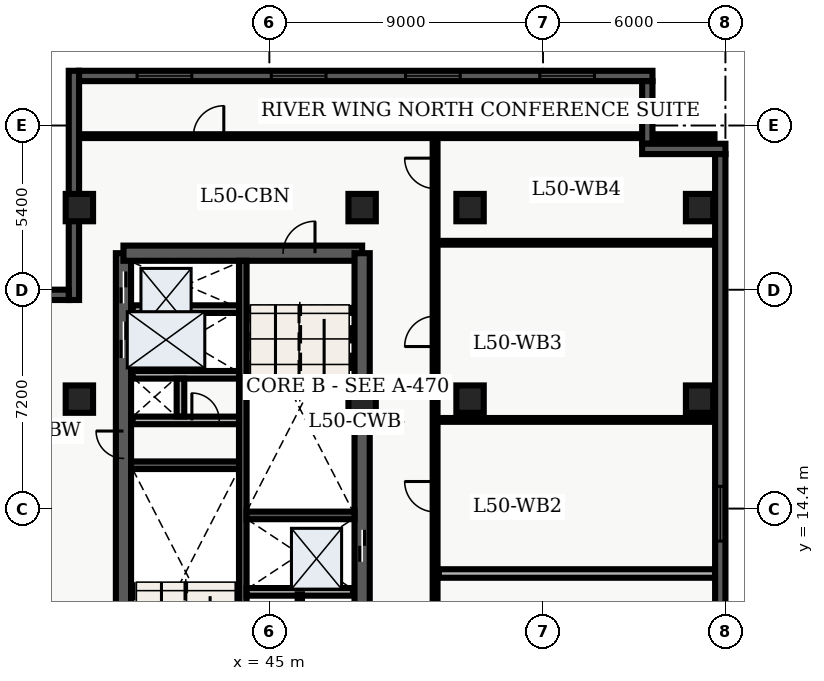
"""IFC4 building model, lengths in metres.
Left out: names, types, materials, properties, quantities, classifications, styles, units other than length and angle.
Written with IfcOpenShell. Run it as: python <this file> out.ifc"""

import sys

from ifc_helpers import new_model, entity, si_unit, converted_unit, direction, frame, origin_with_axes, origin_2d_with_axis, place, context, subcontext, project, spatial, polyline, rectangle, outline, extrude, element, fill, save


model = new_model("IFC4")
c1 = context("Model", 3, precision=1e-05, world=origin_with_axes(), true_north=direction((0.0, 1.0)))
c2 = subcontext(c1, "Body", "Model", "MODEL_VIEW")
j1 = project(units=[si_unit("LENGTHUNIT", "METRE"), converted_unit("PLANEANGLEUNIT", "DEGREE", entity("IfcPlaneAngleMeasure", 0.017), si_unit("PLANEANGLEUNIT", "RADIAN"), dimensions=[0, 0, 0, 0, 0, 0, 0])], contexts=[c1])
p1 = place(None, origin_with_axes())
s1 = spatial("IfcSite", under=j1, at=p1, CompositionType="ELEMENT")
p2 = place(p1, origin_with_axes())
s2 = spatial("IfcBuilding", under=s1, at=p2, CompositionType="ELEMENT")
p3 = place(p2, frame((0.0, 0.0, 204.3), z_axis=(0.0, 0.0, 1.0), x_axis=(1.0, 0.0, 0.0)))
s3 = spatial("IfcBuildingStorey", under=s2, at=p3, CompositionType="ELEMENT", Elevation=204.3)
p4 = place(p3, frame((40.2, 7.2, 0.0), z_axis=(0.0, 0.0, 1.0), x_axis=(0.0, 1.0, 0.0)))
e1 = element("IfcWall", 1, at=p4, inside=s3, PredefinedType="SHEAR", context=c2, shape_type="SweptSolid", body=[
    extrude(outline(polyline([(0.0, -0.25), (15.6, -0.25), (15.6, 0.25), (0.0, 0.25), (0.0, -0.25)])), origin_with_axes(), (0.0, 0.0, 1.0), 3.66),
])
p5 = place(p4, frame((14.475, 0.0, 0.0), z_axis=(0.0, 0.0, 1.0), x_axis=(1.0, 0.0, 0.0)))
e2 = element("IfcOpeningElement", 2, at=p5, cuts=e1, PredefinedType="OPENING", context=c2, shape_type="SweptSolid", body=[
    extrude(rectangle(XDim=1.05, YDim=0.52, at=origin_2d_with_axis()), origin_with_axes(), (0.0, 0.0, 1.0), 2.15),
])
p6 = place(p4, frame((12.75, 0.0, 0.0), z_axis=(0.0, 0.0, 1.0), x_axis=(1.0, 0.0, 0.0)))
e3 = element("IfcOpeningElement", 3, at=p6, cuts=e1, PredefinedType="OPENING", context=c2, shape_type="SweptSolid", body=[
    extrude(rectangle(XDim=1.2, YDim=0.52, at=origin_2d_with_axis()), origin_with_axes(), (0.0, 0.0, 1.0), 2.15),
])
p7 = place(p4, frame((9.3, 0.0, 0.0), z_axis=(0.0, 0.0, 1.0), x_axis=(1.0, 0.0, 0.0)))
e4 = element("IfcOpeningElement", 4, at=p7, cuts=e1, PredefinedType="OPENING", context=c2, shape_type="SweptSolid", body=[
    extrude(rectangle(XDim=0.9, YDim=0.52, at=origin_2d_with_axis()), origin_with_axes(), (0.0, 0.0, 1.0), 2.15),
])
p8 = place(p3, frame((40.2, 22.8, 0.0), z_axis=(0.0, 0.0, 1.0), x_axis=(1.0, 0.0, 0.0)))
e5 = element("IfcWall", 5, at=p8, inside=s3, PredefinedType="SHEAR", context=c2, shape_type="SweptSolid", body=[
    extrude(outline(polyline([(0.0, -0.25), (7.85, -0.25), (7.85, 0.25), (0.0, 0.25), (0.0, -0.25)])), origin_with_axes(), (0.0, 0.0, 1.0), 3.66),
])
p9 = place(p8, frame((5.775, 0.0, 0.0), z_axis=(0.0, 0.0, 1.0), x_axis=(1.0, 0.0, 0.0)))
e6 = element("IfcOpeningElement", 6, at=p9, cuts=e5, PredefinedType="OPENING", context=c2, shape_type="SweptSolid", body=[
    extrude(rectangle(XDim=1.05, YDim=0.52, at=origin_2d_with_axis()), origin_with_axes(), (0.0, 0.0, 1.0), 2.15),
])
p10 = place(p3, frame((48.05, 7.2, 0.0), z_axis=(0.0, 0.0, 1.0), x_axis=(0.0, 1.0, 0.0)))
e7 = element("IfcWall", 7, at=p10, inside=s3, PredefinedType="SHEAR", context=c2, shape_type="SweptSolid", body=[
    extrude(outline(polyline([(0.0, -0.25), (15.6, -0.25), (15.6, 0.25), (0.0, 0.25), (0.0, -0.25)])), origin_with_axes(), (0.0, 0.0, 1.0), 3.66),
])
p11 = place(p10, frame((5.975, 0.0, 0.0), z_axis=(0.0, 0.0, 1.0), x_axis=(1.0, 0.0, 0.0)))
e8 = element("IfcOpeningElement", 8, at=p11, cuts=e7, PredefinedType="OPENING", context=c2, shape_type="SweptSolid", body=[
    extrude(rectangle(XDim=1.05, YDim=0.52, at=origin_2d_with_axis()), origin_with_axes(), (0.0, 0.0, 1.0), 2.15),
])
p12 = place(p10, frame((2.725, 0.0, 0.0), z_axis=(0.0, 0.0, 1.0), x_axis=(1.0, 0.0, 0.0)))
e9 = element("IfcOpeningElement", 9, at=p12, cuts=e7, PredefinedType="OPENING", context=c2, shape_type="SweptSolid", body=[
    extrude(rectangle(XDim=0.95, YDim=0.52, at=origin_2d_with_axis()), origin_with_axes(), (0.0, 0.0, 1.0), 2.15),
])
p13 = place(p3, frame((44.125, 7.45, 0.0), z_axis=(0.0, 0.0, 1.0), x_axis=(0.0, 1.0, 0.0)))
e10 = element("IfcWall", 10, at=p13, inside=s3, PredefinedType="SHEAR", context=c2, shape_type="SweptSolid", body=[
    extrude(outline(polyline([(0.0, -0.125), (15.1, -0.125), (15.1, 0.125), (0.0, 0.125), (0.0, -0.125)])), origin_with_axes(), (0.0, 0.0, 1.0), 3.66),
])
for number, where, z_axis, x_axis in (
    (11, (40.45, 15.825, 0.0), (0.0, 0.0, 1.0), (1.0, 0.0, 0.0)),
    (12, (44.25, 14.175, 0.0), (0.0, 0.0, 1.0), (1.0, 0.0, 0.0)),
):
    element("IfcWall", number, at=place(p3, frame(where, z_axis=z_axis, x_axis=x_axis)), inside=s3, PredefinedType="SHEAR", context=c2, shape_type="SweptSolid", body=[
        extrude(outline(polyline([(0.0, -0.125), (3.55, -0.125), (3.55, 0.125), (0.0, 0.125), (0.0, -0.125)])), origin_with_axes(), (0.0, 0.0, 1.0), 3.66),
    ])
p14 = place(p3, frame((40.5, 17.3, 0.0), z_axis=(0.0, 0.0, 1.0), x_axis=(1.0, 0.0, 0.0)))
e13 = element("IfcWall", 13, at=p14, inside=s3, PredefinedType="SOLIDWALL", context=c2, shape_type="SweptSolid", body=[
    extrude(outline(polyline([(0.0, -0.125), (3.5, -0.125), (3.5, 0.125), (0.0, 0.125), (0.0, -0.125)])), origin_with_axes(), (0.0, 0.0, 1.0), 2.7),
])
p15 = place(p14, frame((2.4, 0.0, 0.0), z_axis=(0.0, 0.0, 1.0), x_axis=(1.0, 0.0, 0.0)))
e14 = element("IfcOpeningElement", 14, at=p15, cuts=e13, PredefinedType="OPENING", context=c2, shape_type="SweptSolid", body=[
    extrude(rectangle(XDim=0.9, YDim=0.27, at=origin_2d_with_axis()), origin_with_axes(), (0.0, 0.0, 1.0), 2.15),
])
p16 = place(p3, frame((40.5, 18.8, 0.0), z_axis=(0.0, 0.0, 1.0), x_axis=(1.0, 0.0, 0.0)))
e15 = element("IfcWall", 15, at=p16, inside=s3, PredefinedType="SOLIDWALL", context=c2, shape_type="SweptSolid", body=[
    extrude(outline(polyline([(0.0, -0.125), (3.5, -0.125), (3.5, 0.125), (0.0, 0.125), (0.0, -0.125)])), origin_with_axes(), (0.0, 0.0, 1.0), 2.7),
])
p17 = place(p3, frame((42.075, 17.43, 0.0), z_axis=(0.0, 0.0, 1.0), x_axis=(0.0, 1.0, 0.0)))
e16 = element("IfcWall", 16, at=p17, inside=s3, PredefinedType="SOLIDWALL", context=c2, shape_type="SweptSolid", body=[
    extrude(outline(polyline([(0.0, -0.125), (1.24, -0.125), (1.24, 0.125), (0.0, 0.125), (0.0, -0.125)])), origin_with_axes(), (0.0, 0.0, 1.0), 2.7),
])
for number, where, z_axis, x_axis in (
    (17, (38.75, 18.0, 0.0), (0.0, 0.0, 1.0), (1.0, 0.0, 0.0)),
    (18, (38.75, 24.3, 0.0), (0.0, 0.0, 1.0), (1.0, 0.0, 0.0)),
    (19, (48.05, 18.0, 0.0), (0.0, 0.0, 1.0), (1.0, 0.0, 0.0)),
    (20, (48.05, 24.3, 0.0), (0.0, 0.0, 1.0), (1.0, 0.0, 0.0)),
    (21, (51.6, 18.0, 0.0), (0.0, 0.0, 1.0), (1.0, 0.0, 0.0)),
    (22, (51.6, 24.3, 0.0), (0.0, 0.0, 1.0), (1.0, 0.0, 0.0)),
    (23, (59.15, 18.0, 0.0), (0.0, 0.0, 1.0), (1.0, 0.0, 0.0)),
    (24, (59.15, 24.3, 0.0), (0.0, 0.0, 1.0), (1.0, 0.0, 0.0)),
):
    element("IfcColumn", number, at=place(p3, frame(where, z_axis=z_axis, x_axis=x_axis)), inside=s3, PredefinedType="COLUMN", context=c2, shape_type="SweptSolid", body=[
        extrude(rectangle(XDim=0.9, YDim=0.9, at=origin_2d_with_axis()), origin_with_axes(), (0.0, 0.0, 1.0), 3.9),
    ])
for number, where, z_axis, x_axis in (
    (25, (40.5, 20.96, 0.0), (0.0, 0.0, 1.0), (1.0, 0.0, 0.0)),
    (26, (44.25, 11.66, 0.0), (0.0, 0.0, 1.0), (1.0, 0.0, 0.0)),
):
    element("IfcWall", number, at=place(p3, frame(where, z_axis=z_axis, x_axis=x_axis)), inside=s3, PredefinedType="SOLIDWALL", context=c2, shape_type="SweptSolid", body=[
        extrude(outline(polyline([(0.0, -0.125), (3.5, -0.125), (3.5, 0.125), (0.0, 0.125), (0.0, -0.125)])), origin_with_axes(), (0.0, 0.0, 1.0), 2.7),
    ])
p18 = place(p3, frame((46.0, 7.5, 0.0), z_axis=(0.0, 0.0, 1.0), x_axis=(0.0, 1.0, 0.0)))
e27 = element("IfcWall", 27, at=p18, inside=s3, PredefinedType="PARTITIONING", context=c2, shape_type="SweptSolid", body=[
    extrude(outline(polyline([(0.0, -0.07), (4.08, -0.07), (4.08, 0.07), (0.0, 0.07), (0.0, -0.07)])), origin_with_axes(), (0.0, 0.0, 1.0), 2.7),
])
p19 = place(p18, frame((2.0, 0.0, 0.0), z_axis=(0.0, 0.0, 1.0), x_axis=(1.0, 0.0, 0.0)))
e28 = element("IfcOpeningElement", 28, at=p19, cuts=e27, PredefinedType="OPENING", context=c2, shape_type="SweptSolid", body=[
    extrude(rectangle(XDim=0.9, YDim=0.16, at=origin_2d_with_axis()), origin_with_axes(), (0.0, 0.0, 1.0), 2.15),
])
p20 = place(p3, frame((50.45, 7.85, 0.0), z_axis=(0.0, 0.0, 1.0), x_axis=(0.0, 1.0, 0.0)))
e29 = element("IfcWall", 29, at=p20, inside=s3, PredefinedType="PARTITIONING", context=c2, shape_type="SweptSolid", body=[
    extrude(outline(polyline([(0.0, -0.08), (18.8, -0.08), (18.8, 0.08), (0.0, 0.08), (0.0, -0.08)])), origin_with_axes(), (0.0, 0.0, 1.0), 2.7),
])
p21 = place(p20, frame((0.987, 0.0, 0.0), z_axis=(0.0, 0.0, 1.0), x_axis=(1.0, 0.0, 0.0)))
e30 = element("IfcOpeningElement", 30, at=p21, cuts=e29, PredefinedType="OPENING", context=c2, shape_type="SweptSolid", body=[
    extrude(rectangle(XDim=0.9, YDim=0.18, at=origin_2d_with_axis()), origin_with_axes(), (0.0, 0.0, 1.0), 2.15),
])
p22 = place(p20, frame((6.94, 0.0, 0.0), z_axis=(0.0, 0.0, 1.0), x_axis=(1.0, 0.0, 0.0)))
e31 = element("IfcOpeningElement", 31, at=p22, cuts=e29, PredefinedType="OPENING", context=c2, shape_type="SweptSolid", body=[
    extrude(rectangle(XDim=1.0, YDim=0.18, at=origin_2d_with_axis()), origin_with_axes(), (0.0, 0.0, 1.0), 2.15),
])
p23 = place(p20, frame((12.38, 0.0, 0.0), z_axis=(0.0, 0.0, 1.0), x_axis=(1.0, 0.0, 0.0)))
e32 = element("IfcOpeningElement", 32, at=p23, cuts=e29, PredefinedType="OPENING", context=c2, shape_type="SweptSolid", body=[
    extrude(rectangle(XDim=1.0, YDim=0.18, at=origin_2d_with_axis()), origin_with_axes(), (0.0, 0.0, 1.0), 2.15),
])
p24 = place(p20, frame((17.576, 0.0, 0.0), z_axis=(0.0, 0.0, 1.0), x_axis=(1.0, 0.0, 0.0)))
e33 = element("IfcOpeningElement", 33, at=p24, cuts=e29, PredefinedType="OPENING", context=c2, shape_type="SweptSolid", body=[
    extrude(rectangle(XDim=1.0, YDim=0.18, at=origin_2d_with_axis()), origin_with_axes(), (0.0, 0.0, 1.0), 2.15),
])
p25 = place(p3, frame((38.735, 26.65, 0.0), z_axis=(0.0, 0.0, 1.0), x_axis=(1.0, 0.0, 0.0)))
e34 = element("IfcWall", 34, at=p25, inside=s3, PredefinedType="PARTITIONING", context=c2, shape_type="SweptSolid", body=[
    extrude(outline(polyline([(0.0, -0.062), (20.905, -0.062), (20.905, 0.062), (0.0, 0.062), (0.0, -0.062)])), origin_with_axes(), (0.0, 0.0, 1.0), 2.7),
])
p26 = place(p25, frame((4.265, 0.0, 0.0), z_axis=(0.0, 0.0, 1.0), x_axis=(1.0, 0.0, 0.0)))
e35 = element("IfcOpeningElement", 35, at=p26, cuts=e34, PredefinedType="OPENING", context=c2, shape_type="SweptSolid", body=[
    extrude(rectangle(XDim=1.0, YDim=0.145, at=origin_2d_with_axis()), origin_with_axes(), (0.0, 0.0, 1.0), 2.15),
])
p27 = place(p3, frame((50.57, 12.264, 0.0), z_axis=(0.0, 0.0, 1.0), x_axis=(1.0, 0.0, 0.0)))
e36 = element("IfcWall", 36, at=p27, inside=s3, PredefinedType="PARTITIONING", context=c2, shape_type="SweptSolid", body=[
    extrude(outline(polyline([(0.0, -0.14), (9.095, -0.14), (9.095, 0.14), (0.0, 0.14), (0.0, -0.14)])), origin_with_axes(), (0.0, 0.0, 1.0), 2.7),
])
for number, where, z_axis, x_axis in (
    (37, (50.57, 17.316, 0.0), (0.0, 0.0, 1.0), (1.0, 0.0, 0.0)),
    (38, (50.57, 23.143, 0.0), (0.0, 0.0, 1.0), (1.0, 0.0, 0.0)),
):
    element("IfcWall", number, at=place(p3, frame(where, z_axis=z_axis, x_axis=x_axis)), inside=s3, PredefinedType="PARTITIONING", context=c2, shape_type="SweptSolid", body=[
        extrude(outline(polyline([(0.0, -0.062), (9.095, -0.062), (9.095, 0.062), (0.0, 0.062), (0.0, -0.062)])), origin_with_axes(), (0.0, 0.0, 1.0), 2.7),
    ])
p28 = place(p3, frame((38.57, 21.26, 0.0), z_axis=(0.0, 0.0, 1.0), x_axis=(0.0, 1.0, 0.0)))
e39 = element("IfcWall", 39, at=p28, inside=s3, PredefinedType="SOLIDWALL", context=c2, shape_type="SweptSolid", body=[
    extrude(outline(polyline([(0.0, -0.17), (7.54, -0.17), (7.54, 0.17), (0.0, 0.17), (0.0, -0.17)])), origin_with_axes(), (0.0, 0.0, 1.0), 3.66),
])
p29 = place(p3, frame((38.74, 28.63, 0.0), z_axis=(0.0, 0.0, 1.0), x_axis=(1.0, 0.0, 0.0)))
e40 = element("IfcWall", 40, at=p29, inside=s3, PredefinedType="SOLIDWALL", context=c2, shape_type="SweptSolid", body=[
    extrude(outline(polyline([(0.0, -0.17), (18.86, -0.17), (18.86, 0.17), (0.0, 0.17), (0.0, -0.17)])), origin_with_axes(), (0.0, 0.0, 1.0), 3.66),
])
p30 = place(p29, frame((2.808, 0.0, 0.45), z_axis=(0.0, 0.0, 1.0), x_axis=(1.0, 0.0, 0.0)))
e41 = element("IfcOpeningElement", 41, at=p30, cuts=e40, PredefinedType="OPENING", context=c2, shape_type="SweptSolid", body=[
    extrude(rectangle(XDim=1.8, YDim=0.36, at=origin_2d_with_axis()), origin_with_axes(), (0.0, 0.0, 1.0), 2.1),
])
p31 = place(p29, frame((7.222, 0.0, 0.45), z_axis=(0.0, 0.0, 1.0), x_axis=(1.0, 0.0, 0.0)))
e42 = element("IfcOpeningElement", 42, at=p31, cuts=e40, PredefinedType="OPENING", context=c2, shape_type="SweptSolid", body=[
    extrude(rectangle(XDim=1.8, YDim=0.36, at=origin_2d_with_axis()), origin_with_axes(), (0.0, 0.0, 1.0), 2.1),
])
p32 = place(p29, frame((11.637, 0.0, 0.45), z_axis=(0.0, 0.0, 1.0), x_axis=(1.0, 0.0, 0.0)))
e43 = element("IfcOpeningElement", 43, at=p32, cuts=e40, PredefinedType="OPENING", context=c2, shape_type="SweptSolid", body=[
    extrude(rectangle(XDim=1.8, YDim=0.36, at=origin_2d_with_axis()), origin_with_axes(), (0.0, 0.0, 1.0), 2.1),
])
p33 = place(p29, frame((16.053, 0.0, 0.45), z_axis=(0.0, 0.0, 1.0), x_axis=(1.0, 0.0, 0.0)))
e44 = element("IfcOpeningElement", 44, at=p33, cuts=e40, PredefinedType="OPENING", context=c2, shape_type="SweptSolid", body=[
    extrude(rectangle(XDim=1.8, YDim=0.36, at=origin_2d_with_axis()), origin_with_axes(), (0.0, 0.0, 1.0), 2.1),
])
p34 = place(p3, frame((57.43, 28.46, 0.0), z_axis=(0.0, 0.0, 1.0), x_axis=(0.0, -1.0, 0.0)))
e45 = element("IfcWall", 45, at=p34, inside=s3, PredefinedType="SOLIDWALL", context=c2, shape_type="SweptSolid", body=[
    extrude(outline(polyline([(0.0, -0.17), (2.06, -0.17), (2.06, 0.17), (0.0, 0.17), (0.0, -0.17)])), origin_with_axes(), (0.0, 0.0, 1.0), 3.66),
])
p35 = place(p3, frame((57.26, 26.23, 0.0), z_axis=(0.0, 0.0, 1.0), x_axis=(1.0, 0.0, 0.0)))
e46 = element("IfcWall", 46, at=p35, inside=s3, PredefinedType="SOLIDWALL", context=c2, shape_type="SweptSolid", body=[
    extrude(outline(polyline([(0.0, -0.17), (2.74, -0.17), (2.74, 0.17), (0.0, 0.17), (0.0, -0.17)])), origin_with_axes(), (0.0, 0.0, 1.0), 3.66),
])
p36 = place(p3, frame((59.83, 26.06, 0.0), z_axis=(0.0, 0.0, 1.0), x_axis=(0.0, -1.0, 0.0)))
e47 = element("IfcWall", 47, at=p36, inside=s3, PredefinedType="SOLIDWALL", context=c2, shape_type="SweptSolid", body=[
    extrude(outline(polyline([(0.0, -0.17), (23.66, -0.17), (23.66, 0.17), (0.0, 0.17), (0.0, -0.17)])), origin_with_axes(), (0.0, 0.0, 1.0), 3.66),
])
p37 = place(p36, frame((11.83, 0.0, 0.45), z_axis=(0.0, 0.0, 1.0), x_axis=(1.0, 0.0, 0.0)))
e48 = element("IfcOpeningElement", 48, at=p37, cuts=e47, PredefinedType="OPENING", context=c2, shape_type="SweptSolid", body=[
    extrude(rectangle(XDim=1.8, YDim=0.36, at=origin_2d_with_axis()), origin_with_axes(), (0.0, 0.0, 1.0), 2.1),
])
p38 = place(p36, frame((20.364, 0.0, 0.45), z_axis=(0.0, 0.0, 1.0), x_axis=(1.0, 0.0, 0.0)))
e49 = element("IfcOpeningElement", 49, at=p38, cuts=e47, PredefinedType="OPENING", context=c2, shape_type="SweptSolid", body=[
    extrude(rectangle(XDim=1.8, YDim=0.36, at=origin_2d_with_axis()), origin_with_axes(), (0.0, 0.0, 1.0), 2.1),
])
p39 = place(p3, frame((29.541, 21.43, 0.0), z_axis=(0.0, 0.0, 1.0), x_axis=(1.0, 0.0, 0.0)))
e50 = element("IfcWall", 50, at=p39, inside=s3, PredefinedType="SOLIDWALL", context=c2, shape_type="SweptSolid", body=[
    extrude(outline(polyline([(0.0, -0.17), (8.859, -0.17), (8.859, 0.17), (0.0, 0.17), (0.0, -0.17)])), origin_with_axes(), (0.0, 0.0, 1.0), 3.66),
])
p40 = place(p39, frame((4.429, 0.0, 0.45), z_axis=(0.0, 0.0, 1.0), x_axis=(1.0, 0.0, 0.0)))
e51 = element("IfcOpeningElement", 51, at=p40, cuts=e50, PredefinedType="OPENING", context=c2, shape_type="SweptSolid", body=[
    extrude(rectangle(XDim=1.8, YDim=0.36, at=origin_2d_with_axis()), origin_with_axes(), (0.0, 0.0, 1.0), 2.1),
])
p41 = place(p10, frame((5.975, 0.0, 0.0), z_axis=(0.0, 0.0, 1.0), x_axis=(1.0, 0.0, 0.0)))
e52 = element("IfcDoor", 52, at=p41, inside=s3, OperationType="SLIDING_TO_LEFT", PredefinedType="DOOR", context=c2, shape_type="SweptSolid", body=[
    extrude(rectangle(XDim=1.05, YDim=0.09, at=origin_2d_with_axis()), origin_with_axes(), (0.0, 0.0, 1.0), 2.15),
])
fill(e8, e52)
p42 = place(p4, frame((14.475, 0.0, 0.0), z_axis=(0.0, 0.0, 1.0), x_axis=(1.0, 0.0, 0.0)))
e53 = element("IfcDoor", 53, at=p42, inside=s3, OperationType="SLIDING_TO_RIGHT", PredefinedType="DOOR", context=c2, shape_type="SweptSolid", body=[
    extrude(rectangle(XDim=1.05, YDim=0.09, at=origin_2d_with_axis()), origin_with_axes(), (0.0, 0.0, 1.0), 2.15),
])
fill(e2, e53)
p43 = place(p4, frame((12.75, 0.0, 0.0), z_axis=(0.0, 0.0, 1.0), x_axis=(1.0, 0.0, 0.0)))
e54 = element("IfcDoor", 54, at=p43, inside=s3, OperationType="DOUBLE_DOOR_SLIDING", PredefinedType="DOOR", context=c2, shape_type="SweptSolid", body=[
    extrude(rectangle(XDim=1.2, YDim=0.09, at=origin_2d_with_axis()), origin_with_axes(), (0.0, 0.0, 1.0), 2.15),
])
fill(e3, e54)
p44 = place(p4, frame((9.3, 0.0, 0.0), z_axis=(0.0, 0.0, 1.0), x_axis=(1.0, 0.0, 0.0)))
e55 = element("IfcDoor", 55, at=p44, inside=s3, OperationType="SINGLE_SWING_RIGHT", PredefinedType="DOOR", context=c2, shape_type="SweptSolid", body=[
    extrude(rectangle(XDim=0.9, YDim=0.09, at=origin_2d_with_axis()), origin_with_axes(), (0.0, 0.0, 1.0), 2.15),
])
fill(e4, e55)
p45 = place(p14, frame((2.4, 0.0, 0.0), z_axis=(0.0, 0.0, 1.0), x_axis=(1.0, 0.0, 0.0)))
e56 = element("IfcDoor", 56, at=p45, inside=s3, OperationType="SINGLE_SWING_LEFT", PredefinedType="DOOR", context=c2, shape_type="SweptSolid", body=[
    extrude(rectangle(XDim=0.9, YDim=0.09, at=origin_2d_with_axis()), origin_with_axes(), (0.0, 0.0, 1.0), 2.15),
])
fill(e14, e56)
p46 = place(p8, frame((5.775, 0.0, 0.0), z_axis=(0.0, 0.0, 1.0), x_axis=(1.0, 0.0, 0.0)))
e57 = element("IfcDoor", 57, at=p46, inside=s3, OperationType="SINGLE_SWING_RIGHT", PredefinedType="DOOR", context=c2, shape_type="SweptSolid", body=[
    extrude(rectangle(XDim=1.05, YDim=0.09, at=origin_2d_with_axis()), origin_with_axes(), (0.0, 0.0, 1.0), 2.15),
])
fill(e6, e57)
p47 = place(p25, frame((4.265, 0.0, 0.0), z_axis=(0.0, 0.0, 1.0), x_axis=(1.0, 0.0, 0.0)))
e58 = element("IfcDoor", 58, at=p47, inside=s3, OperationType="SINGLE_SWING_RIGHT", PredefinedType="DOOR", context=c2, shape_type="SweptSolid", body=[
    extrude(rectangle(XDim=1.0, YDim=0.075, at=origin_2d_with_axis()), origin_with_axes(), (0.0, 0.0, 1.0), 2.15),
])
fill(e35, e58)
p48 = place(p20, frame((6.94, 0.0, 0.0), z_axis=(0.0, 0.0, 1.0), x_axis=(1.0, 0.0, 0.0)))
e59 = element("IfcDoor", 59, at=p48, inside=s3, OperationType="SINGLE_SWING_RIGHT", PredefinedType="DOOR", context=c2, shape_type="SweptSolid", body=[
    extrude(rectangle(XDim=1.0, YDim=0.09, at=origin_2d_with_axis()), origin_with_axes(), (0.0, 0.0, 1.0), 2.15),
])
fill(e31, e59)
p49 = place(p20, frame((12.38, 0.0, 0.0), z_axis=(0.0, 0.0, 1.0), x_axis=(1.0, 0.0, 0.0)))
e60 = element("IfcDoor", 60, at=p49, inside=s3, OperationType="SINGLE_SWING_LEFT", PredefinedType="DOOR", context=c2, shape_type="SweptSolid", body=[
    extrude(rectangle(XDim=1.0, YDim=0.09, at=origin_2d_with_axis()), origin_with_axes(), (0.0, 0.0, 1.0), 2.15),
])
fill(e32, e60)
p50 = place(p20, frame((17.576, 0.0, 0.0), z_axis=(0.0, 0.0, 1.0), x_axis=(1.0, 0.0, 0.0)))
e61 = element("IfcDoor", 61, at=p50, inside=s3, OperationType="SINGLE_SWING_RIGHT", PredefinedType="DOOR", context=c2, shape_type="SweptSolid", body=[
    extrude(rectangle(XDim=1.0, YDim=0.09, at=origin_2d_with_axis()), origin_with_axes(), (0.0, 0.0, 1.0), 2.15),
])
fill(e33, e61)
p51 = place(p29, frame((2.808, 0.0, 0.45), z_axis=(0.0, 0.0, 1.0), x_axis=(1.0, 0.0, 0.0)))
e62 = element("IfcWindow", 62, at=p51, inside=s3, PredefinedType="WINDOW", context=c2, shape_type="SweptSolid", body=[
    extrude(rectangle(XDim=1.8, YDim=0.09, at=origin_2d_with_axis()), origin_with_axes(), (0.0, 0.0, 1.0), 2.1),
])
fill(e41, e62)
p52 = place(p29, frame((7.222, 0.0, 0.45), z_axis=(0.0, 0.0, 1.0), x_axis=(1.0, 0.0, 0.0)))
e63 = element("IfcWindow", 63, at=p52, inside=s3, PredefinedType="WINDOW", context=c2, shape_type="SweptSolid", body=[
    extrude(rectangle(XDim=1.8, YDim=0.09, at=origin_2d_with_axis()), origin_with_axes(), (0.0, 0.0, 1.0), 2.1),
])
fill(e42, e63)
p53 = place(p29, frame((11.637, 0.0, 0.45), z_axis=(0.0, 0.0, 1.0), x_axis=(1.0, 0.0, 0.0)))
e64 = element("IfcWindow", 64, at=p53, inside=s3, PredefinedType="WINDOW", context=c2, shape_type="SweptSolid", body=[
    extrude(rectangle(XDim=1.8, YDim=0.09, at=origin_2d_with_axis()), origin_with_axes(), (0.0, 0.0, 1.0), 2.1),
])
fill(e43, e64)
p54 = place(p29, frame((16.053, 0.0, 0.45), z_axis=(0.0, 0.0, 1.0), x_axis=(1.0, 0.0, 0.0)))
e65 = element("IfcWindow", 65, at=p54, inside=s3, PredefinedType="WINDOW", context=c2, shape_type="SweptSolid", body=[
    extrude(rectangle(XDim=1.8, YDim=0.09, at=origin_2d_with_axis()), origin_with_axes(), (0.0, 0.0, 1.0), 2.1),
])
fill(e44, e65)
p55 = place(p36, frame((11.83, 0.0, 0.45), z_axis=(0.0, 0.0, 1.0), x_axis=(1.0, 0.0, 0.0)))
e66 = element("IfcWindow", 66, at=p55, inside=s3, PredefinedType="WINDOW", context=c2, shape_type="SweptSolid", body=[
    extrude(rectangle(XDim=1.8, YDim=0.09, at=origin_2d_with_axis()), origin_with_axes(), (0.0, 0.0, 1.0), 2.1),
])
fill(e48, e66)
save(model, sys.argv[1])
